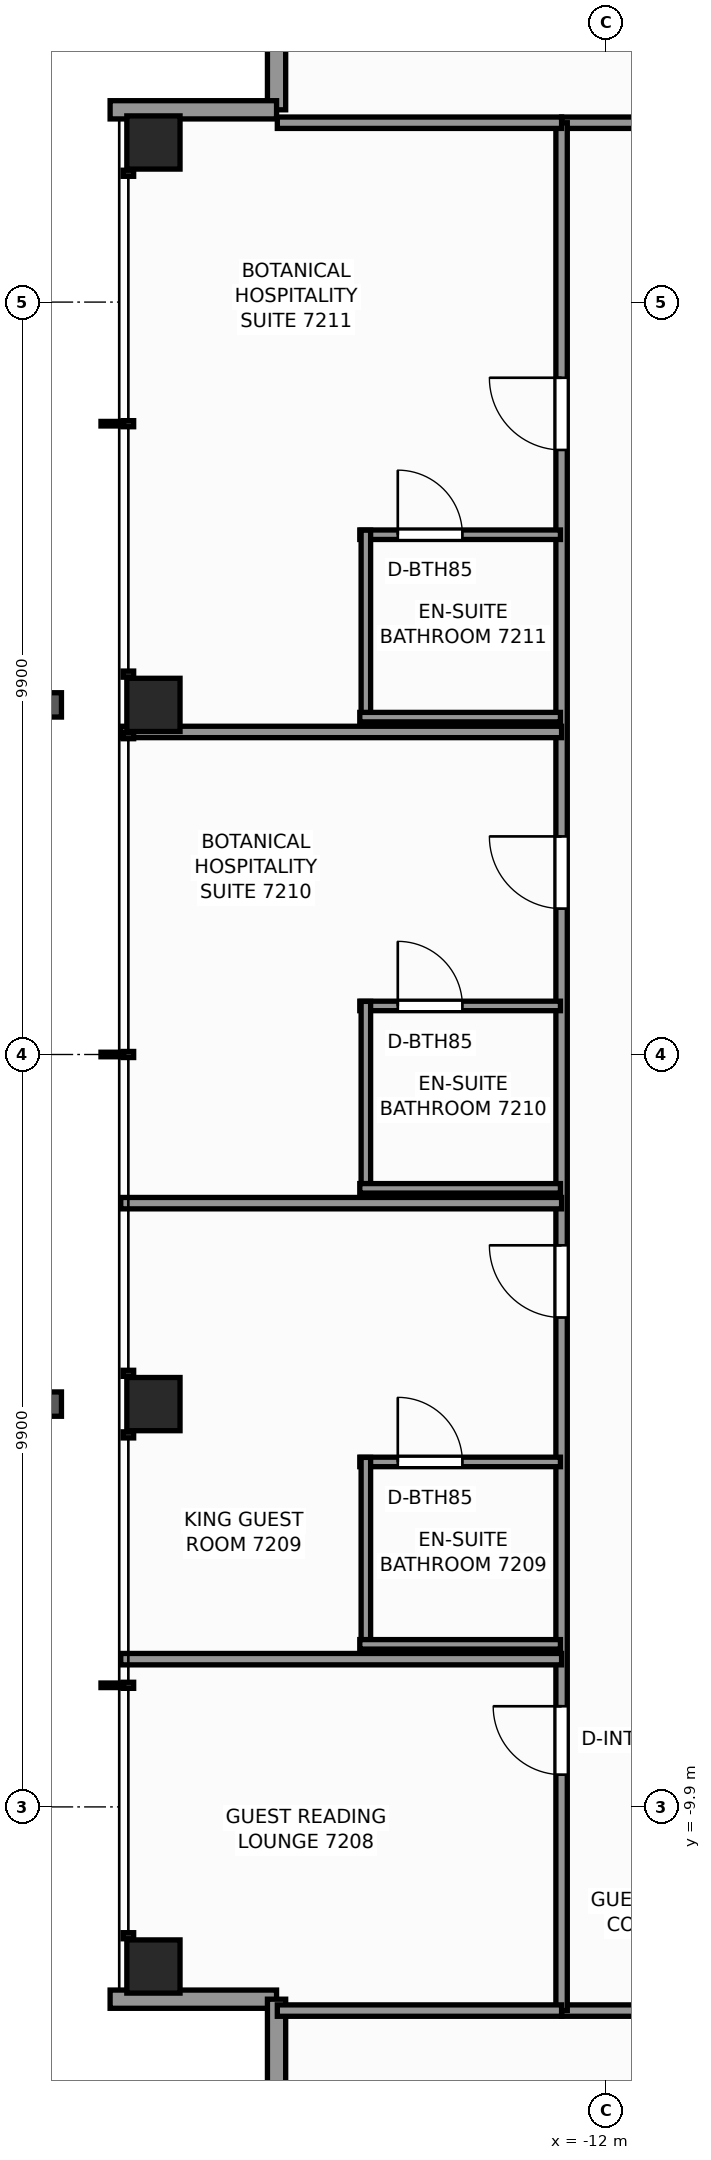
"""IFC4 building model, lengths in metres.
Left out: names, types, materials, properties, quantities, classifications, styles, units other than length and angle.
Written with IfcOpenShell. Run it as: python <this file> out.ifc"""

import sys

from ifc_helpers import new_model, si_unit, direction, frame, frame_2d, origin, origin_2d, place, context, subcontext, project, spatial, rectangle, extrude, element, fill, save


model = new_model("IFC4")
c1 = context("Model", 3, precision=1e-05, world=origin(), true_north=direction((0.0, 1.0)))
c2 = subcontext(c1, "Body", "Model", "MODEL_VIEW")
j1 = project(units=[si_unit("LENGTHUNIT", "METRE"), si_unit("PLANEANGLEUNIT", "RADIAN")], contexts=[c1])
p1 = place(None, origin())
s1 = spatial("IfcSite", under=j1, at=p1, CompositionType="ELEMENT")
p2 = place(p1, origin())
s2 = spatial("IfcBuilding", under=s1, at=p2, CompositionType="ELEMENT")
p3 = place(p2, frame((0.0, 0.0, 247.9)))
s3 = spatial("IfcBuildingStorey", under=s2, at=p3, CompositionType="ELEMENT", Elevation=247.9)
for number, where, z_axis, x_axis in (
    (1, (-17.95, -12.0, 0.0), (0.0, 0.0, 1.0), (1.0, 0.0, 0.0)),
    (2, (-17.95, -4.6, 0.0), (0.0, 0.0, 1.0), (1.0, 0.0, 0.0)),
    (3, (-17.95, 4.6, 0.0), (0.0, 0.0, 1.0), (1.0, 0.0, 0.0)),
    (4, (-17.95, 12.0, 0.0), (0.0, 0.0, 1.0), (1.0, 0.0, 0.0)),
):
    element("IfcColumn", number, at=place(p3, frame(where, z_axis=z_axis, x_axis=x_axis)), inside=s3, PredefinedType="COLUMN", context=c2, shape_type="SweptSolid", body=[
        extrude(rectangle(XDim=0.7, YDim=0.7, at=origin_2d()), origin(), (0.0, 0.0, 1.0), 3.5),
    ])
p4 = place(p3, frame((-16.33, 12.43, 0.0), z_axis=(0.0, 0.0, 1.0), x_axis=(0.0, 1.0, 0.0)))
e5 = element("IfcWall", 5, at=p4, inside=s3, PredefinedType="STANDARD", context=c2, shape_type="SweptSolid", body=[
    extrude(rectangle(XDim=2.19, YDim=0.24, at=frame_2d((1.095, 0.0))), origin(), (0.0, 0.0, 1.0), 2.633),
])
for number, where, z_axis, x_axis in (
    (6, (-18.52, 12.43, 0.0), (0.0, 0.0, 1.0), (1.0, 0.0, 0.0)),
    (7, (-16.33, -12.43, 0.0), (0.0, 0.0, 1.0), (-1.0, 0.0, 0.0)),
):
    element("IfcWall", number, at=place(p3, frame(where, z_axis=z_axis, x_axis=x_axis)), inside=s3, PredefinedType="STANDARD", context=c2, shape_type="SweptSolid", body=[
        extrude(rectangle(XDim=2.19, YDim=0.24, at=frame_2d((1.095, 0.0))), origin(), (0.0, 0.0, 1.0), 2.633),
    ])
p5 = place(p3, frame((-16.33, -14.62, 0.0), z_axis=(0.0, 0.0, 1.0), x_axis=(0.0, 1.0, 0.0)))
e8 = element("IfcWall", 8, at=p5, inside=s3, PredefinedType="STANDARD", context=c2, shape_type="SweptSolid", body=[
    extrude(rectangle(XDim=2.19, YDim=0.24, at=frame_2d((1.095, 0.0))), origin(), (0.0, 0.0, 1.0), 2.633),
])
p6 = place(p3, frame((-12.58, -12.58, 0.0), z_axis=(0.0, 0.0, 1.0), x_axis=(1.0, 0.0, 0.0)))
e9 = element("IfcWall", 9, at=p6, inside=s3, PredefinedType="PARTITIONING", context=c2, shape_type="SweptSolid", body=[
    extrude(rectangle(XDim=24.84, YDim=0.15, at=frame_2d((12.42, 0.0))), origin(), (0.0, 0.0, 1.0), 2.539),
])
p7 = place(p6, frame((3.363, 0.0, 0.0)))
e10 = element("IfcOpeningElement", 10, at=p7, cuts=e9, PredefinedType="OPENING", context=c2, shape_type="SweptSolid", body=[
    extrude(rectangle(XDim=0.9, YDim=2.06, at=frame_2d((0.45, 1.03))), frame((0.0, 0.085, 0.0), z_axis=(0.0, -1.0, 0.0), x_axis=(1.0, 0.0, 0.0)), (0.0, 0.0, 1.0), 0.17),
])
p8 = place(p6, frame((5.698, 0.0, 0.0)))
e11 = element("IfcOpeningElement", 11, at=p8, cuts=e9, PredefinedType="OPENING", context=c2, shape_type="SweptSolid", body=[
    extrude(rectangle(XDim=0.9, YDim=2.06, at=frame_2d((0.45, 1.03))), frame((0.0, 0.085, 0.0), z_axis=(0.0, -1.0, 0.0), x_axis=(1.0, 0.0, 0.0)), (0.0, 0.0, 1.0), 0.17),
])
p9 = place(p6, frame((9.266, 0.0, 0.0)))
e12 = element("IfcOpeningElement", 12, at=p9, cuts=e9, PredefinedType="OPENING", context=c2, shape_type="SweptSolid", body=[
    extrude(rectangle(XDim=0.9, YDim=2.06, at=frame_2d((0.45, 1.03))), frame((0.0, 0.085, 0.0), z_axis=(0.0, -1.0, 0.0), x_axis=(1.0, 0.0, 0.0)), (0.0, 0.0, 1.0), 0.17),
])
p10 = place(p6, frame((13.388, 0.0, 0.0)))
e13 = element("IfcOpeningElement", 13, at=p10, cuts=e9, PredefinedType="OPENING", context=c2, shape_type="SweptSolid", body=[
    extrude(rectangle(XDim=0.95, YDim=2.06, at=frame_2d((0.475, 1.03))), frame((0.0, 0.085, 0.0), z_axis=(0.0, -1.0, 0.0), x_axis=(1.0, 0.0, 0.0)), (0.0, 0.0, 1.0), 0.17),
])
p11 = place(p6, frame((18.661, 0.0, 0.0)))
e14 = element("IfcOpeningElement", 14, at=p11, cuts=e9, PredefinedType="OPENING", context=c2, shape_type="SweptSolid", body=[
    extrude(rectangle(XDim=0.9, YDim=2.06, at=frame_2d((0.45, 1.03))), frame((0.0, 0.085, 0.0), z_axis=(0.0, -1.0, 0.0), x_axis=(1.0, 0.0, 0.0)), (0.0, 0.0, 1.0), 0.17),
])
p12 = place(p6, frame((20.996, 0.0, 0.0)))
e15 = element("IfcOpeningElement", 15, at=p12, cuts=e9, PredefinedType="OPENING", context=c2, shape_type="SweptSolid", body=[
    extrude(rectangle(XDim=0.9, YDim=2.06, at=frame_2d((0.45, 1.03))), frame((0.0, 0.085, 0.0), z_axis=(0.0, -1.0, 0.0), x_axis=(1.0, 0.0, 0.0)), (0.0, 0.0, 1.0), 0.17),
])
p13 = place(p3, frame((-12.58, 12.26, 0.0), z_axis=(0.0, 0.0, 1.0), x_axis=(1.0, 0.0, 0.0)))
e16 = element("IfcWall", 16, at=p13, inside=s3, PredefinedType="PARTITIONING", context=c2, shape_type="SweptSolid", body=[
    extrude(rectangle(XDim=24.84, YDim=0.15, at=frame_2d((12.42, 0.0))), origin(), (0.0, 0.0, 1.0), 2.539),
])
p14 = place(p13, frame((4.073, 0.0, 0.0)))
e17 = element("IfcOpeningElement", 17, at=p14, cuts=e16, PredefinedType="OPENING", context=c2, shape_type="SweptSolid", body=[
    extrude(rectangle(XDim=0.95, YDim=2.06, at=frame_2d((0.475, 1.03))), frame((0.0, 0.085, 0.0), z_axis=(0.0, -1.0, 0.0), x_axis=(1.0, 0.0, 0.0)), (0.0, 0.0, 1.0), 0.17),
])
p15 = place(p13, frame((19.665, 0.0, 0.0)))
e18 = element("IfcOpeningElement", 18, at=p15, cuts=e16, PredefinedType="OPENING", context=c2, shape_type="SweptSolid", body=[
    extrude(rectangle(XDim=0.9, YDim=2.06, at=frame_2d((0.45, 1.03))), frame((0.0, 0.085, 0.0), z_axis=(0.0, -1.0, 0.0), x_axis=(1.0, 0.0, 0.0)), (0.0, 0.0, 1.0), 0.17),
])
p16 = place(p3, frame((-12.58, -12.58, 0.0), z_axis=(0.0, 0.0, 1.0), x_axis=(0.0, 1.0, 0.0)))
e19 = element("IfcWall", 19, at=p16, inside=s3, PredefinedType="PARTITIONING", context=c2, shape_type="SweptSolid", body=[
    extrude(rectangle(XDim=24.84, YDim=0.15, at=frame_2d((12.42, 0.0))), origin(), (0.0, 0.0, 1.0), 2.539),
])
p17 = place(p16, frame((3.104, 0.0, 0.0)))
e20 = element("IfcOpeningElement", 20, at=p17, cuts=e19, PredefinedType="OPENING", context=c2, shape_type="SweptSolid", body=[
    extrude(rectangle(XDim=0.9, YDim=2.06, at=frame_2d((0.45, 1.03))), frame((0.0, 0.085, 0.0), z_axis=(0.0, -1.0, 0.0), x_axis=(1.0, 0.0, 0.0)), (0.0, 0.0, 1.0), 0.17),
])
p18 = place(p16, frame((9.119, 0.0, 0.0)))
e21 = element("IfcOpeningElement", 21, at=p18, cuts=e19, PredefinedType="OPENING", context=c2, shape_type="SweptSolid", body=[
    extrude(rectangle(XDim=0.95, YDim=2.06, at=frame_2d((0.475, 1.03))), frame((0.0, 0.085, 0.0), z_axis=(0.0, -1.0, 0.0), x_axis=(1.0, 0.0, 0.0)), (0.0, 0.0, 1.0), 0.17),
])
p19 = place(p16, frame((14.5, 0.0, 0.0)))
e22 = element("IfcOpeningElement", 22, at=p19, cuts=e19, PredefinedType="OPENING", context=c2, shape_type="SweptSolid", body=[
    extrude(rectangle(XDim=0.95, YDim=2.06, at=frame_2d((0.475, 1.03))), frame((0.0, 0.085, 0.0), z_axis=(0.0, -1.0, 0.0), x_axis=(1.0, 0.0, 0.0)), (0.0, 0.0, 1.0), 0.17),
])
p20 = place(p16, frame((20.534, 0.0, 0.0)))
e23 = element("IfcOpeningElement", 23, at=p20, cuts=e19, PredefinedType="OPENING", context=c2, shape_type="SweptSolid", body=[
    extrude(rectangle(XDim=0.95, YDim=2.06, at=frame_2d((0.475, 1.03))), frame((0.0, 0.085, 0.0), z_axis=(0.0, -1.0, 0.0), x_axis=(1.0, 0.0, 0.0)), (0.0, 0.0, 1.0), 0.17),
])
for number, where, z_axis, x_axis in (
    (24, (-16.32, -12.58, 0.0), (0.0, 0.0, 1.0), (1.0, 0.0, 0.0)),
    (25, (-16.32, 12.26, 0.0), (0.0, 0.0, 1.0), (1.0, 0.0, 0.0)),
):
    element("IfcWall", number, at=place(p3, frame(where, z_axis=z_axis, x_axis=x_axis)), inside=s3, PredefinedType="PARTITIONING", context=c2, shape_type="SweptSolid", body=[
        extrude(rectangle(XDim=3.74, YDim=0.15, at=frame_2d((1.87, 0.0))), origin(), (0.0, 0.0, 1.0), 3.25),
    ])
for number, where, z_axis, x_axis in (
    (26, (-18.38, -7.956, 0.0), (0.0, 0.0, 1.0), (1.0, 0.0, 0.0)),
    (27, (-18.38, -1.956, 0.0), (0.0, 0.0, 1.0), (1.0, 0.0, 0.0)),
):
    element("IfcWall", number, at=place(p3, frame(where, z_axis=z_axis, x_axis=x_axis)), inside=s3, PredefinedType="PARTITIONING", context=c2, shape_type="SweptSolid", body=[
        extrude(rectangle(XDim=5.8, YDim=0.15, at=frame_2d((2.9, 0.0))), origin(), (0.0, 0.0, 1.0), 2.623),
    ])
p21 = place(p3, frame((-15.235, -5.361, 0.0), z_axis=(0.0, 0.0, 1.0), x_axis=(1.0, 0.0, 0.0)))
e28 = element("IfcWall", 28, at=p21, inside=s3, PredefinedType="PARTITIONING", context=c2, shape_type="SweptSolid", body=[
    extrude(rectangle(XDim=2.64, YDim=0.125, at=frame_2d((1.32, 0.0))), origin(), (0.0, 0.0, 1.0), 3.25),
])
p22 = place(p21, frame((0.5, 0.0, 0.0)))
e29 = element("IfcOpeningElement", 29, at=p22, cuts=e28, PredefinedType="OPENING", context=c2, shape_type="SweptSolid", body=[
    extrude(rectangle(XDim=0.85, YDim=2.03, at=frame_2d((0.425, 1.015))), frame((0.0, 0.073, 0.0), z_axis=(0.0, -1.0, 0.0), x_axis=(1.0, 0.0, 0.0)), (0.0, 0.0, 1.0), 0.145),
])
p23 = place(p3, frame((-15.155, -7.821, 0.0), z_axis=(0.0, 0.0, 1.0), x_axis=(0.0, 1.0, 0.0)))
e30 = element("IfcWall", 30, at=p23, inside=s3, PredefinedType="PARTITIONING", context=c2, shape_type="SweptSolid", body=[
    extrude(rectangle(XDim=2.52, YDim=0.125, at=frame_2d((1.26, 0.0))), origin(), (0.0, 0.0, 1.0), 3.25),
])
p24 = place(p3, frame((-15.235, -7.761, 0.0), z_axis=(0.0, 0.0, 1.0), x_axis=(1.0, 0.0, 0.0)))
e31 = element("IfcWall", 31, at=p24, inside=s3, PredefinedType="PARTITIONING", context=c2, shape_type="SweptSolid", body=[
    extrude(rectangle(XDim=2.64, YDim=0.125, at=frame_2d((1.32, 0.0))), origin(), (0.0, 0.0, 1.0), 3.25),
])
p25 = place(p3, frame((-18.38, 4.244, 0.0), z_axis=(0.0, 0.0, 1.0), x_axis=(1.0, 0.0, 0.0)))
e32 = element("IfcWall", 32, at=p25, inside=s3, PredefinedType="PARTITIONING", context=c2, shape_type="SweptSolid", body=[
    extrude(rectangle(XDim=5.8, YDim=0.15, at=frame_2d((2.9, 0.0))), origin(), (0.0, 0.0, 1.0), 2.623),
])
p26 = place(p3, frame((-15.235, 0.639, 0.0), z_axis=(0.0, 0.0, 1.0), x_axis=(1.0, 0.0, 0.0)))
e33 = element("IfcWall", 33, at=p26, inside=s3, PredefinedType="PARTITIONING", context=c2, shape_type="SweptSolid", body=[
    extrude(rectangle(XDim=2.64, YDim=0.125, at=frame_2d((1.32, 0.0))), origin(), (0.0, 0.0, 1.0), 3.25),
])
p27 = place(p26, frame((0.5, 0.0, 0.0)))
e34 = element("IfcOpeningElement", 34, at=p27, cuts=e33, PredefinedType="OPENING", context=c2, shape_type="SweptSolid", body=[
    extrude(rectangle(XDim=0.85, YDim=2.03, at=frame_2d((0.425, 1.015))), frame((0.0, 0.073, 0.0), z_axis=(0.0, -1.0, 0.0), x_axis=(1.0, 0.0, 0.0)), (0.0, 0.0, 1.0), 0.145),
])
p28 = place(p3, frame((-15.155, -1.821, 0.0), z_axis=(0.0, 0.0, 1.0), x_axis=(0.0, 1.0, 0.0)))
e35 = element("IfcWall", 35, at=p28, inside=s3, PredefinedType="PARTITIONING", context=c2, shape_type="SweptSolid", body=[
    extrude(rectangle(XDim=2.52, YDim=0.125, at=frame_2d((1.26, 0.0))), origin(), (0.0, 0.0, 1.0), 2.775),
])
p29 = place(p3, frame((-15.235, -1.761, 0.0), z_axis=(0.0, 0.0, 1.0), x_axis=(1.0, 0.0, 0.0)))
e36 = element("IfcWall", 36, at=p29, inside=s3, PredefinedType="PARTITIONING", context=c2, shape_type="SweptSolid", body=[
    extrude(rectangle(XDim=2.64, YDim=0.125, at=frame_2d((1.32, 0.0))), origin(), (0.0, 0.0, 1.0), 3.25),
])
p30 = place(p3, frame((-15.235, 6.839, 0.0), z_axis=(0.0, 0.0, 1.0), x_axis=(1.0, 0.0, 0.0)))
e37 = element("IfcWall", 37, at=p30, inside=s3, PredefinedType="PARTITIONING", context=c2, shape_type="SweptSolid", body=[
    extrude(rectangle(XDim=2.64, YDim=0.125, at=frame_2d((1.32, 0.0))), origin(), (0.0, 0.0, 1.0), 3.25),
])
p31 = place(p30, frame((0.5, 0.0, 0.0)))
e38 = element("IfcOpeningElement", 38, at=p31, cuts=e37, PredefinedType="OPENING", context=c2, shape_type="SweptSolid", body=[
    extrude(rectangle(XDim=0.85, YDim=2.03, at=frame_2d((0.425, 1.015))), frame((0.0, 0.073, 0.0), z_axis=(0.0, -1.0, 0.0), x_axis=(1.0, 0.0, 0.0)), (0.0, 0.0, 1.0), 0.145),
])
p32 = place(p3, frame((-15.155, 4.379, 0.0), z_axis=(0.0, 0.0, 1.0), x_axis=(0.0, 1.0, 0.0)))
e39 = element("IfcWall", 39, at=p32, inside=s3, PredefinedType="PARTITIONING", context=c2, shape_type="SweptSolid", body=[
    extrude(rectangle(XDim=2.52, YDim=0.125, at=frame_2d((1.26, 0.0))), origin(), (0.0, 0.0, 1.0), 2.539),
])
p33 = place(p3, frame((-15.235, 4.439, 0.0), z_axis=(0.0, 0.0, 1.0), x_axis=(1.0, 0.0, 0.0)))
e40 = element("IfcWall", 40, at=p33, inside=s3, PredefinedType="PARTITIONING", context=c2, shape_type="SweptSolid", body=[
    extrude(rectangle(XDim=2.64, YDim=0.125, at=frame_2d((1.32, 0.0))), origin(), (0.0, 0.0, 1.0), 2.539),
])
p34 = place(p17, origin())
e41 = element("IfcDoor", 41, at=p34, inside=s3, OperationType="SINGLE_SWING_RIGHT", PredefinedType="DOOR", context=c2, shape_type="SweptSolid", body=[
    extrude(rectangle(XDim=0.9, YDim=2.06, at=frame_2d((0.45, 1.03))), frame((0.0, 0.025, 0.0), z_axis=(0.0, -1.0, 0.0), x_axis=(1.0, 0.0, 0.0)), (0.0, 0.0, 1.0), 0.05),
])
fill(e20, e41)
p35 = place(p22, origin())
e42 = element("IfcDoor", 42, at=p35, inside=s3, OperationType="SINGLE_SWING_LEFT", PredefinedType="DOOR", context=c2, shape_type="SweptSolid", body=[
    extrude(rectangle(XDim=0.85, YDim=2.03, at=frame_2d((0.425, 1.015))), frame((0.0, 0.025, 0.0), z_axis=(0.0, -1.0, 0.0), x_axis=(1.0, 0.0, 0.0)), (0.0, 0.0, 1.0), 0.05),
])
fill(e29, e42)
p36 = place(p18, origin())
e43 = element("IfcDoor", 43, at=p36, inside=s3, OperationType="SINGLE_SWING_RIGHT", PredefinedType="DOOR", context=c2, shape_type="SweptSolid", body=[
    extrude(rectangle(XDim=0.95, YDim=2.06, at=frame_2d((0.475, 1.03))), frame((0.0, 0.025, 0.0), z_axis=(0.0, -1.0, 0.0), x_axis=(1.0, 0.0, 0.0)), (0.0, 0.0, 1.0), 0.05),
])
fill(e21, e43)
p37 = place(p27, origin())
e44 = element("IfcDoor", 44, at=p37, inside=s3, OperationType="SINGLE_SWING_LEFT", PredefinedType="DOOR", context=c2, shape_type="SweptSolid", body=[
    extrude(rectangle(XDim=0.85, YDim=2.03, at=frame_2d((0.425, 1.015))), frame((0.0, 0.025, 0.0), z_axis=(0.0, -1.0, 0.0), x_axis=(1.0, 0.0, 0.0)), (0.0, 0.0, 1.0), 0.05),
])
fill(e34, e44)
p38 = place(p19, origin())
e45 = element("IfcDoor", 45, at=p38, inside=s3, OperationType="SINGLE_SWING_RIGHT", PredefinedType="DOOR", context=c2, shape_type="SweptSolid", body=[
    extrude(rectangle(XDim=0.95, YDim=2.06, at=frame_2d((0.475, 1.03))), frame((0.0, 0.025, 0.0), z_axis=(0.0, -1.0, 0.0), x_axis=(1.0, 0.0, 0.0)), (0.0, 0.0, 1.0), 0.05),
])
fill(e22, e45)
p39 = place(p31, origin())
e46 = element("IfcDoor", 46, at=p39, inside=s3, OperationType="SINGLE_SWING_LEFT", PredefinedType="DOOR", context=c2, shape_type="SweptSolid", body=[
    extrude(rectangle(XDim=0.85, YDim=2.03, at=frame_2d((0.425, 1.015))), frame((0.0, 0.025, 0.0), z_axis=(0.0, -1.0, 0.0), x_axis=(1.0, 0.0, 0.0)), (0.0, 0.0, 1.0), 0.05),
])
fill(e38, e46)
p40 = place(p20, origin())
e47 = element("IfcDoor", 47, at=p40, inside=s3, OperationType="SINGLE_SWING_RIGHT", PredefinedType="DOOR", context=c2, shape_type="SweptSolid", body=[
    extrude(rectangle(XDim=0.95, YDim=2.06, at=frame_2d((0.475, 1.03))), frame((0.0, 0.025, 0.0), z_axis=(0.0, -1.0, 0.0), x_axis=(1.0, 0.0, 0.0)), (0.0, 0.0, 1.0), 0.05),
])
fill(e23, e47)
save(model, sys.argv[1])
